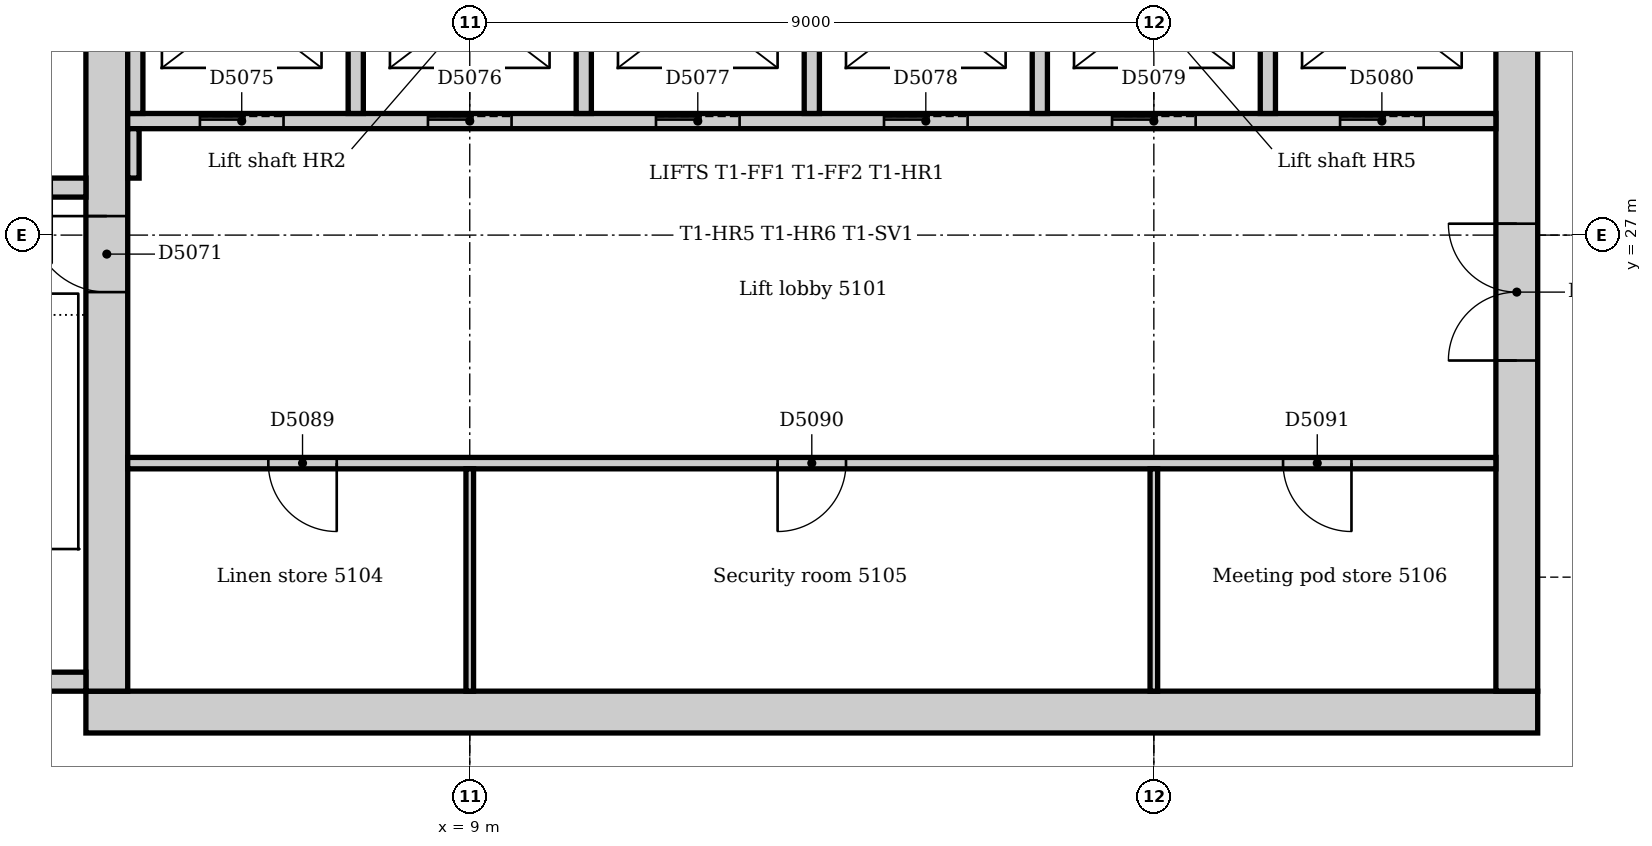
"""IFC4 building model, lengths in metres.
Left out: names, types, materials, properties, quantities, classifications, styles, units other than length and angle.
Written with IfcOpenShell. Run it as: python <this file> out.ifc"""

import sys

from ifc_helpers import new_model, si_unit, direction, frame, frame_2d, origin, place, context, subcontext, project, spatial, rectangle, extrude, element, fill, save


model = new_model("IFC4")
c1 = context("Model", 3, precision=1e-05, world=origin(), true_north=direction((0.0, 1.0)))
c2 = subcontext(c1, "Body", "Model", "MODEL_VIEW")
j1 = project(units=[si_unit("LENGTHUNIT", "METRE"), si_unit("PLANEANGLEUNIT", "RADIAN")], contexts=[c1])
p1 = place(None, origin())
s1 = spatial("IfcSite", under=j1, at=p1, CompositionType="ELEMENT")
p2 = place(p1, origin())
s2 = spatial("IfcBuilding", under=s1, at=p2, CompositionType="ELEMENT")
p3 = place(p2, frame((0.0, 0.0, 214.0)))
s3 = spatial("IfcBuildingStorey", under=s2, at=p3, CompositionType="ELEMENT", Elevation=214.0)
p4 = place(p3, frame((3.95, 20.725, 0.0), z_axis=(0.0, 0.0, 1.0), x_axis=(1.0, 0.0, 0.0)))
e1 = element("IfcWall", 1, at=p4, inside=s3, PredefinedType="SOLIDWALL", context=c2, shape_type="SweptSolid", body=[
    extrude(rectangle(XDim=19.1, YDim=0.55, at=frame_2d((9.55, 0.0))), origin(), (0.0, 0.0, 1.0), 4.0),
])
p5 = place(p3, frame((22.775, 21.0, 0.0), z_axis=(0.0, 0.0, 1.0), x_axis=(0.0, 1.0, 0.0)))
e2 = element("IfcWall", 2, at=p5, inside=s3, PredefinedType="SOLIDWALL", context=c2, shape_type="SweptSolid", body=[
    extrude(rectangle(XDim=10.5, YDim=0.55, at=frame_2d((5.25, 0.0))), origin(), (0.0, 0.0, 1.0), 4.0),
])
p6 = place(p5, frame((4.35, 0.0, 0.0)))
e3 = element("IfcOpeningElement", 3, at=p6, cuts=e2, PredefinedType="OPENING", context=c2, shape_type="SweptSolid", body=[
    extrude(rectangle(XDim=1.8, YDim=2.1, at=frame_2d((0.9, 1.05))), frame((0.0, 0.285, 0.0), z_axis=(0.0, -1.0, 0.0), x_axis=(1.0, 0.0, 0.0)), (0.0, 0.0, 1.0), 0.57),
])
p7 = place(p3, frame((4.225, 31.5, 0.0), z_axis=(0.0, 0.0, 1.0), x_axis=(0.0, -1.0, 0.0)))
e4 = element("IfcWall", 4, at=p7, inside=s3, PredefinedType="SOLIDWALL", context=c2, shape_type="SweptSolid", body=[
    extrude(rectangle(XDim=10.5, YDim=0.55, at=frame_2d((5.25, 0.0))), origin(), (0.0, 0.0, 1.0), 4.0),
])
p8 = place(p7, frame((4.25, 0.0, 0.0)))
e5 = element("IfcOpeningElement", 5, at=p8, cuts=e4, PredefinedType="OPENING", context=c2, shape_type="SweptSolid", body=[
    extrude(rectangle(XDim=1.0, YDim=2.1, at=frame_2d((0.5, 1.05))), frame((0.0, 0.285, 0.0), z_axis=(0.0, -1.0, 0.0), x_axis=(1.0, 0.0, 0.0)), (0.0, 0.0, 1.0), 0.57),
])
p9 = place(p3, frame((0.36, 21.125, 0.0), z_axis=(0.0, 0.0, 1.0), x_axis=(1.0, 0.0, 0.0)))
e6 = element("IfcWall", 6, at=p9, inside=s3, PredefinedType="SOLIDWALL", context=c2, shape_type="SweptSolid", body=[
    extrude(rectangle(XDim=3.59, YDim=0.25, at=frame_2d((1.795, 0.0))), origin(), (0.0, 0.0, 1.0), 4.0),
])
p10 = place(p3, frame((3.95, 27.625, 0.0), z_axis=(0.0, 0.0, 1.0), x_axis=(-1.0, 0.0, 0.0)))
e7 = element("IfcWall", 7, at=p10, inside=s3, PredefinedType="SOLIDWALL", context=c2, shape_type="SweptSolid", body=[
    extrude(rectangle(XDim=3.59, YDim=0.25, at=frame_2d((1.795, 0.0))), origin(), (0.0, 0.0, 1.0), 4.0),
])
p11 = place(p10, frame((0.45, 0.0, 0.0)))
e8 = element("IfcOpeningElement", 8, at=p11, cuts=e7, PredefinedType="OPENING", context=c2, shape_type="SweptSolid", body=[
    extrude(rectangle(XDim=1.0, YDim=2.1, at=frame_2d((0.5, 1.05))), frame((0.0, 0.135, 0.0), z_axis=(0.0, -1.0, 0.0), x_axis=(1.0, 0.0, 0.0)), (0.0, 0.0, 1.0), 0.27),
])
p12 = place(p3, frame((4.5, 28.5, 0.0), z_axis=(0.0, 0.0, 1.0), x_axis=(1.0, 0.0, 0.0)))
e9 = element("IfcWall", 9, at=p12, inside=s3, PredefinedType="PARTITIONING", context=c2, shape_type="SweptSolid", body=[
    extrude(rectangle(XDim=18.0, YDim=0.2, at=frame_2d((9.0, 0.0))), origin(), (0.0, 0.0, 1.0), 3.85),
])
p13 = place(p12, frame((0.95, 0.0, 0.0)))
e10 = element("IfcOpeningElement", 10, at=p13, cuts=e9, PredefinedType="OPENING", context=c2, shape_type="SweptSolid", body=[
    extrude(rectangle(XDim=1.1, YDim=2.1, at=frame_2d((0.55, 1.05))), frame((0.0, 0.11, 0.0), z_axis=(0.0, -1.0, 0.0), x_axis=(1.0, 0.0, 0.0)), (0.0, 0.0, 1.0), 0.22),
])
p14 = place(p12, frame((3.95, 0.0, 0.0)))
e11 = element("IfcOpeningElement", 11, at=p14, cuts=e9, PredefinedType="OPENING", context=c2, shape_type="SweptSolid", body=[
    extrude(rectangle(XDim=1.1, YDim=2.1, at=frame_2d((0.55, 1.05))), frame((0.0, 0.11, 0.0), z_axis=(0.0, -1.0, 0.0), x_axis=(1.0, 0.0, 0.0)), (0.0, 0.0, 1.0), 0.22),
])
p15 = place(p12, frame((6.95, 0.0, 0.0)))
e12 = element("IfcOpeningElement", 12, at=p15, cuts=e9, PredefinedType="OPENING", context=c2, shape_type="SweptSolid", body=[
    extrude(rectangle(XDim=1.1, YDim=2.1, at=frame_2d((0.55, 1.05))), frame((0.0, 0.11, 0.0), z_axis=(0.0, -1.0, 0.0), x_axis=(1.0, 0.0, 0.0)), (0.0, 0.0, 1.0), 0.22),
])
p16 = place(p12, frame((9.95, 0.0, 0.0)))
e13 = element("IfcOpeningElement", 13, at=p16, cuts=e9, PredefinedType="OPENING", context=c2, shape_type="SweptSolid", body=[
    extrude(rectangle(XDim=1.1, YDim=2.1, at=frame_2d((0.55, 1.05))), frame((0.0, 0.11, 0.0), z_axis=(0.0, -1.0, 0.0), x_axis=(1.0, 0.0, 0.0)), (0.0, 0.0, 1.0), 0.22),
])
p17 = place(p12, frame((12.95, 0.0, 0.0)))
e14 = element("IfcOpeningElement", 14, at=p17, cuts=e9, PredefinedType="OPENING", context=c2, shape_type="SweptSolid", body=[
    extrude(rectangle(XDim=1.1, YDim=2.1, at=frame_2d((0.55, 1.05))), frame((0.0, 0.11, 0.0), z_axis=(0.0, -1.0, 0.0), x_axis=(1.0, 0.0, 0.0)), (0.0, 0.0, 1.0), 0.22),
])
p18 = place(p12, frame((15.95, 0.0, 0.0)))
e15 = element("IfcOpeningElement", 15, at=p18, cuts=e9, PredefinedType="OPENING", context=c2, shape_type="SweptSolid", body=[
    extrude(rectangle(XDim=1.1, YDim=2.1, at=frame_2d((0.55, 1.05))), frame((0.0, 0.11, 0.0), z_axis=(0.0, -1.0, 0.0), x_axis=(1.0, 0.0, 0.0)), (0.0, 0.0, 1.0), 0.22),
])
for number, where, z_axis, x_axis in (
    (16, (10.5, 28.6, 0.0), (0.0, 0.0, 1.0), (0.0, 1.0, 0.0)),
    (17, (13.5, 28.6, 0.0), (0.0, 0.0, 1.0), (0.0, 1.0, 0.0)),
    (18, (16.5, 28.6, 0.0), (0.0, 0.0, 1.0), (0.0, 1.0, 0.0)),
    (19, (19.5, 28.6, 0.0), (0.0, 0.0, 1.0), (0.0, 1.0, 0.0)),
    (20, (4.6, 28.6, 0.0), (0.0, 0.0, 1.0), (0.0, 1.0, 0.0)),
    (21, (7.5, 28.6, 0.0), (0.0, 0.0, 1.0), (0.0, 1.0, 0.0)),
):
    element("IfcWall", number, at=place(p3, frame(where, z_axis=z_axis, x_axis=x_axis)), inside=s3, PredefinedType="PARTITIONING", context=c2, shape_type="SweptSolid", body=[
        extrude(rectangle(XDim=2.65, YDim=0.2, at=frame_2d((1.325, 0.0))), origin(), (0.0, 0.0, 1.0), 3.85),
    ])
p19 = place(p3, frame((4.5, 24.0, 0.0), z_axis=(0.0, 0.0, 1.0), x_axis=(1.0, 0.0, 0.0)))
e22 = element("IfcWall", 22, at=p19, inside=s3, PredefinedType="PARTITIONING", context=c2, shape_type="SweptSolid", body=[
    extrude(rectangle(XDim=18.0, YDim=0.15, at=frame_2d((9.0, 0.0))), origin(), (0.0, 0.0, 1.0), 3.85),
])
p20 = place(p19, frame((1.85, 0.0, 0.0)))
e23 = element("IfcOpeningElement", 23, at=p20, cuts=e22, PredefinedType="OPENING", context=c2, shape_type="SweptSolid", body=[
    extrude(rectangle(XDim=0.9, YDim=2.1, at=frame_2d((0.45, 1.05))), frame((0.0, 0.085, 0.0), z_axis=(0.0, -1.0, 0.0), x_axis=(1.0, 0.0, 0.0)), (0.0, 0.0, 1.0), 0.17),
])
p21 = place(p19, frame((8.55, 0.0, 0.0)))
e24 = element("IfcOpeningElement", 24, at=p21, cuts=e22, PredefinedType="OPENING", context=c2, shape_type="SweptSolid", body=[
    extrude(rectangle(XDim=0.9, YDim=2.1, at=frame_2d((0.45, 1.05))), frame((0.0, 0.085, 0.0), z_axis=(0.0, -1.0, 0.0), x_axis=(1.0, 0.0, 0.0)), (0.0, 0.0, 1.0), 0.17),
])
p22 = place(p19, frame((15.2, 0.0, 0.0)))
e25 = element("IfcOpeningElement", 25, at=p22, cuts=e22, PredefinedType="OPENING", context=c2, shape_type="SweptSolid", body=[
    extrude(rectangle(XDim=0.9, YDim=2.1, at=frame_2d((0.45, 1.05))), frame((0.0, 0.085, 0.0), z_axis=(0.0, -1.0, 0.0), x_axis=(1.0, 0.0, 0.0)), (0.0, 0.0, 1.0), 0.17),
])
p23 = place(p3, frame((4.575, 27.75, 0.0), z_axis=(0.0, 0.0, 1.0), x_axis=(0.0, 1.0, 0.0)))
e26 = element("IfcWall", 26, at=p23, inside=s3, PredefinedType="PARTITIONING", context=c2, shape_type="SweptSolid", body=[
    extrude(rectangle(XDim=0.65, YDim=0.15, at=frame_2d((0.325, 0.0))), origin(), (0.0, 0.0, 1.0), 3.85),
])
for number, where, z_axis, x_axis in (
    (27, (9.0, 21.0, 0.0), (0.0, 0.0, 1.0), (0.0, 1.0, 0.0)),
    (28, (18.0, 21.0, 0.0), (0.0, 0.0, 1.0), (0.0, 1.0, 0.0)),
):
    element("IfcWall", number, at=place(p3, frame(where, z_axis=z_axis, x_axis=x_axis)), inside=s3, PredefinedType="PARTITIONING", context=c2, shape_type="SweptSolid", body=[
        extrude(rectangle(XDim=2.925, YDim=0.1, at=frame_2d((1.462, 0.0))), origin(), (0.0, 0.0, 1.0), 3.85),
    ])
p24 = place(p8, frame((1.0, 0.0, 0.0), z_axis=(0.0, 0.0, 1.0), x_axis=(-1.0, 0.0, 0.0)))
e29 = element("IfcDoor", 29, at=p24, inside=s3, OperationType="SINGLE_SWING_RIGHT", PredefinedType="DOOR", context=c2, shape_type="SweptSolid", body=[
    extrude(rectangle(XDim=1.0, YDim=2.1, at=frame_2d((0.5, 1.05))), frame((0.0, 0.025, 0.0), z_axis=(0.0, -1.0, 0.0), x_axis=(1.0, 0.0, 0.0)), (0.0, 0.0, 1.0), 0.05),
])
fill(e5, e29)
p25 = place(p13, origin())
e30 = element("IfcDoor", 30, at=p25, inside=s3, OperationType="SLIDING_TO_LEFT", PredefinedType="DOOR", context=c2, shape_type="SweptSolid", body=[
    extrude(rectangle(XDim=1.1, YDim=2.1, at=frame_2d((0.55, 1.05))), frame((0.0, 0.025, 0.0), z_axis=(0.0, -1.0, 0.0), x_axis=(1.0, 0.0, 0.0)), (0.0, 0.0, 1.0), 0.05),
])
fill(e10, e30)
p26 = place(p14, origin())
e31 = element("IfcDoor", 31, at=p26, inside=s3, OperationType="SLIDING_TO_LEFT", PredefinedType="DOOR", context=c2, shape_type="SweptSolid", body=[
    extrude(rectangle(XDim=1.1, YDim=2.1, at=frame_2d((0.55, 1.05))), frame((0.0, 0.025, 0.0), z_axis=(0.0, -1.0, 0.0), x_axis=(1.0, 0.0, 0.0)), (0.0, 0.0, 1.0), 0.05),
])
fill(e11, e31)
p27 = place(p15, origin())
e32 = element("IfcDoor", 32, at=p27, inside=s3, OperationType="SLIDING_TO_LEFT", PredefinedType="DOOR", context=c2, shape_type="SweptSolid", body=[
    extrude(rectangle(XDim=1.1, YDim=2.1, at=frame_2d((0.55, 1.05))), frame((0.0, 0.025, 0.0), z_axis=(0.0, -1.0, 0.0), x_axis=(1.0, 0.0, 0.0)), (0.0, 0.0, 1.0), 0.05),
])
fill(e12, e32)
p28 = place(p16, origin())
e33 = element("IfcDoor", 33, at=p28, inside=s3, OperationType="SLIDING_TO_LEFT", PredefinedType="DOOR", context=c2, shape_type="SweptSolid", body=[
    extrude(rectangle(XDim=1.1, YDim=2.1, at=frame_2d((0.55, 1.05))), frame((0.0, 0.025, 0.0), z_axis=(0.0, -1.0, 0.0), x_axis=(1.0, 0.0, 0.0)), (0.0, 0.0, 1.0), 0.05),
])
fill(e13, e33)
p29 = place(p17, origin())
e34 = element("IfcDoor", 34, at=p29, inside=s3, OperationType="SLIDING_TO_LEFT", PredefinedType="DOOR", context=c2, shape_type="SweptSolid", body=[
    extrude(rectangle(XDim=1.1, YDim=2.1, at=frame_2d((0.55, 1.05))), frame((0.0, 0.025, 0.0), z_axis=(0.0, -1.0, 0.0), x_axis=(1.0, 0.0, 0.0)), (0.0, 0.0, 1.0), 0.05),
])
fill(e14, e34)
p30 = place(p18, origin())
e35 = element("IfcDoor", 35, at=p30, inside=s3, OperationType="SLIDING_TO_LEFT", PredefinedType="DOOR", context=c2, shape_type="SweptSolid", body=[
    extrude(rectangle(XDim=1.1, YDim=2.1, at=frame_2d((0.55, 1.05))), frame((0.0, 0.025, 0.0), z_axis=(0.0, -1.0, 0.0), x_axis=(1.0, 0.0, 0.0)), (0.0, 0.0, 1.0), 0.05),
])
fill(e15, e35)
p31 = place(p6, origin())
e36 = element("IfcDoor", 36, at=p31, inside=s3, OperationType="DOUBLE_DOOR_DOUBLE_SWING", PredefinedType="DOOR", context=c2, shape_type="SweptSolid", body=[
    extrude(rectangle(XDim=1.8, YDim=2.1, at=frame_2d((0.9, 1.05))), frame((0.0, 0.025, 0.0), z_axis=(0.0, -1.0, 0.0), x_axis=(1.0, 0.0, 0.0)), (0.0, 0.0, 1.0), 0.05),
])
fill(e3, e36)
p32 = place(p20, frame((0.9, 0.0, 0.0), z_axis=(0.0, 0.0, 1.0), x_axis=(-1.0, 0.0, 0.0)))
e37 = element("IfcDoor", 37, at=p32, inside=s3, OperationType="SINGLE_SWING_LEFT", PredefinedType="DOOR", context=c2, shape_type="SweptSolid", body=[
    extrude(rectangle(XDim=0.9, YDim=2.1, at=frame_2d((0.45, 1.05))), frame((0.0, 0.025, 0.0), z_axis=(0.0, -1.0, 0.0), x_axis=(1.0, 0.0, 0.0)), (0.0, 0.0, 1.0), 0.05),
])
fill(e23, e37)
p33 = place(p21, frame((0.9, 0.0, 0.0), z_axis=(0.0, 0.0, 1.0), x_axis=(-1.0, 0.0, 0.0)))
e38 = element("IfcDoor", 38, at=p33, inside=s3, OperationType="SINGLE_SWING_RIGHT", PredefinedType="DOOR", context=c2, shape_type="SweptSolid", body=[
    extrude(rectangle(XDim=0.9, YDim=2.1, at=frame_2d((0.45, 1.05))), frame((0.0, 0.025, 0.0), z_axis=(0.0, -1.0, 0.0), x_axis=(1.0, 0.0, 0.0)), (0.0, 0.0, 1.0), 0.05),
])
fill(e24, e38)
p34 = place(p22, frame((0.9, 0.0, 0.0), z_axis=(0.0, 0.0, 1.0), x_axis=(-1.0, 0.0, 0.0)))
e39 = element("IfcDoor", 39, at=p34, inside=s3, OperationType="SINGLE_SWING_LEFT", PredefinedType="DOOR", context=c2, shape_type="SweptSolid", body=[
    extrude(rectangle(XDim=0.9, YDim=2.1, at=frame_2d((0.45, 1.05))), frame((0.0, 0.025, 0.0), z_axis=(0.0, -1.0, 0.0), x_axis=(1.0, 0.0, 0.0)), (0.0, 0.0, 1.0), 0.05),
])
fill(e25, e39)
save(model, sys.argv[1])
